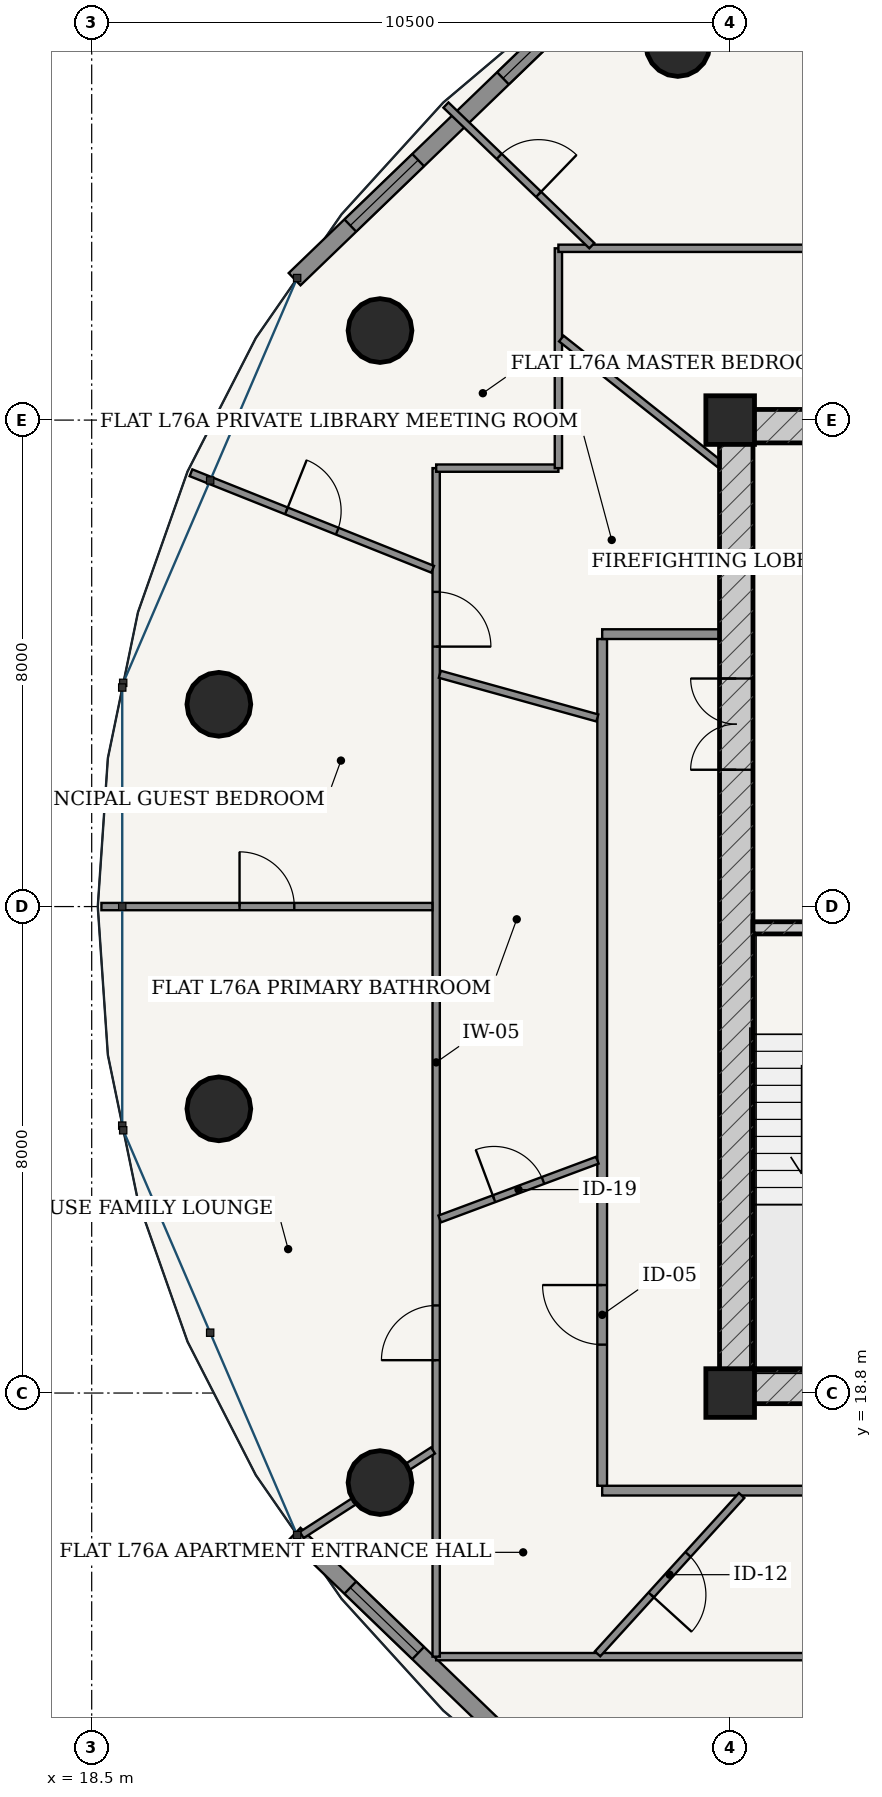
"""IFC4 building model, lengths in metres.
Left out: names, types, materials, properties, quantities, classifications, styles, units other than length and angle.
Written with IfcOpenShell. Run it as: python <this file> out.ifc"""

import sys

from ifc_helpers import new_model, si_unit, direction, frame, frame_2d, origin, origin_2d, place, context, subcontext, project, spatial, rectangle, hollow_circle, extrude, source, transform, mapped, element, fill, save


model = new_model("IFC4")
c1 = context("Model", 3, precision=1e-05, world=origin(), true_north=direction((-0.2419218956, 0.970295726276)))
c2 = subcontext(c1, "Body", "Model", "MODEL_VIEW")
j1 = project(units=[si_unit("LENGTHUNIT", "METRE"), si_unit("PLANEANGLEUNIT", "RADIAN")], contexts=[c1])
p1 = place(None, origin())
s1 = spatial("IfcSite", under=j1, at=p1, CompositionType="ELEMENT")
p2 = place(p1, origin())
s2 = spatial("IfcBuilding", under=s1, at=p2, CompositionType="ELEMENT")
p3 = place(p2, frame((0.0, 0.0, 289.45)))
s3 = spatial("IfcBuildingStorey", under=s2, at=p3, CompositionType="ELEMENT", Elevation=289.45)
for number, where, z_axis, x_axis in (
    (1, (29.0, 18.8, 0.0), (0.0, 0.0, 1.0), (1.0, 0.0, 0.0)),
    (2, (29.0, 34.8, 0.0), (0.0, 0.0, 1.0), (1.0, 0.0, 0.0)),
):
    element("IfcColumn", number, at=place(p3, frame(where, z_axis=z_axis, x_axis=x_axis)), inside=s3, PredefinedType="COLUMN", context=c2, shape_type="SweptSolid", body=[
        extrude(rectangle(XDim=0.8, YDim=0.8, at=origin_2d()), origin(), (0.0, 0.0, 1.0), 3.75),
    ])
p4 = place(p3, frame((28.825, 18.9, 0.0), z_axis=(0.0, 0.0, 1.0), x_axis=(1.0, 0.0, 0.0)))
e3 = element("IfcWall", 3, at=p4, inside=s3, PredefinedType="SHEAR", context=c2, shape_type="SweptSolid", body=[
    extrude(rectangle(XDim=18.35, YDim=0.55, at=frame_2d((9.175, 0.0))), origin(), (0.0, 0.0, 1.0), 3.49),
])
p5 = place(p4, frame((7.41, 0.0, 0.0)))
e4 = element("IfcOpeningElement", 4, at=p5, cuts=e3, PredefinedType="OPENING", context=c2, shape_type="SweptSolid", body=[
    extrude(rectangle(XDim=0.85, YDim=2.1, at=frame_2d((0.425, 1.05))), frame((0.0, 0.285, 0.0), z_axis=(0.0, -1.0, 0.0), x_axis=(1.0, 0.0, 0.0)), (0.0, 0.0, 1.0), 0.57),
])
p6 = place(p4, frame((10.49, 0.0, 0.0)))
e5 = element("IfcOpeningElement", 5, at=p6, cuts=e3, PredefinedType="OPENING", context=c2, shape_type="SweptSolid", body=[
    extrude(rectangle(XDim=0.85, YDim=2.1, at=frame_2d((0.425, 1.05))), frame((0.0, 0.285, 0.0), z_axis=(0.0, -1.0, 0.0), x_axis=(1.0, 0.0, 0.0)), (0.0, 0.0, 1.0), 0.57),
])
p7 = place(p3, frame((28.825, 34.7, 0.0), z_axis=(0.0, 0.0, 1.0), x_axis=(1.0, 0.0, 0.0)))
e6 = element("IfcWall", 6, at=p7, inside=s3, PredefinedType="SHEAR", context=c2, shape_type="SweptSolid", body=[
    extrude(rectangle(XDim=18.35, YDim=0.55, at=frame_2d((9.175, 0.0))), origin(), (0.0, 0.0, 1.0), 3.49),
])
p8 = place(p3, frame((29.1, 19.175, 0.0), z_axis=(0.0, 0.0, 1.0), x_axis=(0.0, 1.0, 0.0)))
e7 = element("IfcWall", 7, at=p8, inside=s3, PredefinedType="SHEAR", context=c2, shape_type="SweptSolid", body=[
    extrude(rectangle(XDim=15.25, YDim=0.55, at=frame_2d((7.625, 0.0))), origin(), (0.0, 0.0, 1.0), 3.49),
])
p9 = place(p8, frame((9.875, 0.0, 0.0)))
e8 = element("IfcOpeningElement", 8, at=p9, cuts=e7, PredefinedType="OPENING", context=c2, shape_type="SweptSolid", body=[
    extrude(rectangle(XDim=1.5, YDim=2.2, at=frame_2d((0.75, 1.1))), frame((0.0, 0.285, 0.0), z_axis=(0.0, -1.0, 0.0), x_axis=(1.0, 0.0, 0.0)), (0.0, 0.0, 1.0), 0.57),
])
p10 = place(p3, frame((29.375, 26.45, 0.0), z_axis=(0.0, 0.0, 1.0), x_axis=(1.0, 0.0, 0.0)))
e9 = element("IfcWall", 9, at=p10, inside=s3, PredefinedType="SOLIDWALL", context=c2, shape_type="SweptSolid", body=[
    extrude(rectangle(XDim=3.32, YDim=0.2, at=frame_2d((1.66, 0.0))), origin(), (0.0, 0.0, 1.0), 3.49),
])
p11 = place(p10, frame((1.185, 0.0, 0.0)))
e10 = element("IfcOpeningElement", 10, at=p11, cuts=e9, PredefinedType="OPENING", context=c2, shape_type="SweptSolid", body=[
    extrude(rectangle(XDim=0.95, YDim=2.15, at=frame_2d((0.475, 1.075))), frame((0.0, 0.11, 0.0), z_axis=(0.0, -1.0, 0.0), x_axis=(1.0, 0.0, 0.0)), (0.0, 0.0, 1.0), 0.22),
])
for number, where, z_axis, x_axis in (
    (11, (28.139, 40.977, 0.0), (0.0, 0.0, 1.0), (1.0, 0.0, 0.0)),
    (12, (23.241, 36.272, 0.0), (0.0, 0.0, 1.0), (1.0, 0.0, 0.0)),
    (13, (20.591, 30.126, 0.0), (0.0, 0.0, 1.0), (1.0, 0.0, 0.0)),
    (14, (20.591, 23.474, 0.0), (0.0, 0.0, 1.0), (1.0, 0.0, 0.0)),
    (15, (23.241, 17.328, 0.0), (0.0, 0.0, 1.0), (1.0, 0.0, 0.0)),
):
    element("IfcColumn", number, at=place(p3, frame(where, z_axis=z_axis, x_axis=x_axis)), inside=s3, PredefinedType="COLUMN", context=c2, shape_type="SweptSolid", body=[
        extrude(hollow_circle(Radius=0.525, WallThickness=0.035, at=origin_2d()), origin(), (0.0, 0.0, 1.0), 3.75),
    ])
p12 = place(p3, frame((27.296, 42.379, 0.0), z_axis=(0.0, 0.0, 1.0), x_axis=(-0.719979309073, -0.693995529169, 0.0)))
e16 = element("IfcWall", 16, at=p12, inside=s3, PredefinedType="SOLIDWALL", context=c2, shape_type="SweptSolid", body=[
    extrude(rectangle(XDim=7.583, YDim=0.28, at=frame_2d((3.791, 0.0))), origin(), (0.0, 0.0, 1.0), 3.49),
])
p13 = place(p12, frame((1.272, 0.0, 0.85)))
e17 = element("IfcOpeningElement", 17, at=p13, cuts=e16, PredefinedType="OPENING", context=c2, shape_type="SweptSolid", body=[
    extrude(rectangle(XDim=1.55, YDim=1.95, at=frame_2d((0.775, 0.975))), frame((0.0, 0.15, 0.0), z_axis=(0.0, -1.0, 0.0), x_axis=(1.0, 0.0, 0.0)), (0.0, 0.0, 1.0), 0.3),
])
p14 = place(p12, frame((4.76, 0.0, 0.85)))
e18 = element("IfcOpeningElement", 18, at=p14, cuts=e16, PredefinedType="OPENING", context=c2, shape_type="SweptSolid", body=[
    extrude(rectangle(XDim=1.55, YDim=1.95, at=frame_2d((0.775, 0.975))), frame((0.0, 0.15, 0.0), z_axis=(0.0, -1.0, 0.0), x_axis=(1.0, 0.0, 0.0)), (0.0, 0.0, 1.0), 0.3),
])
p15 = place(p3, frame((21.837, 16.483, 0.0), z_axis=(0.0, 0.0, 1.0), x_axis=(0.719995397366, -0.69397883813, 0.0)))
e19 = element("IfcWall", 19, at=p15, inside=s3, PredefinedType="SOLIDWALL", context=c2, shape_type="SweptSolid", body=[
    extrude(rectangle(XDim=7.582, YDim=0.28, at=frame_2d((3.791, 0.0))), origin(), (0.0, 0.0, 1.0), 3.49),
])
p16 = place(p15, frame((1.272, 0.0, 0.85)))
e20 = element("IfcOpeningElement", 20, at=p16, cuts=e19, PredefinedType="OPENING", context=c2, shape_type="SweptSolid", body=[
    extrude(rectangle(XDim=1.55, YDim=1.95, at=frame_2d((0.775, 0.975))), frame((0.0, 0.15, 0.0), z_axis=(0.0, -1.0, 0.0), x_axis=(1.0, 0.0, 0.0)), (0.0, 0.0, 1.0), 0.3),
])
p17 = place(p15, frame((4.76, 0.0, 0.85)))
e21 = element("IfcOpeningElement", 21, at=p17, cuts=e19, PredefinedType="OPENING", context=c2, shape_type="SweptSolid", body=[
    extrude(rectangle(XDim=1.55, YDim=1.95, at=frame_2d((0.775, 0.975))), frame((0.0, 0.15, 0.0), z_axis=(0.0, -1.0, 0.0), x_axis=(1.0, 0.0, 0.0)), (0.0, 0.0, 1.0), 0.3),
])
p18 = place(p3, frame((26.895, 17.195, 0.0), z_axis=(0.0, 0.0, 1.0), x_axis=(1.0, 0.0, 0.0)))
e22 = element("IfcWall", 22, at=p18, inside=s3, PredefinedType="PARTITIONING", context=c2, shape_type="SweptSolid", body=[
    extrude(rectangle(XDim=22.21, YDim=0.16, at=frame_2d((11.105, 0.0))), origin(), (0.0, 0.0, 1.0), 3.015),
])
p19 = place(p18, frame((17.365, 0.0, 0.0)))
e23 = element("IfcOpeningElement", 23, at=p19, cuts=e22, PredefinedType="OPENING", context=c2, shape_type="SweptSolid", body=[
    extrude(rectangle(XDim=0.98, YDim=2.2, at=frame_2d((0.49, 1.1))), frame((0.0, 0.09, 0.0), z_axis=(0.0, -1.0, 0.0), x_axis=(1.0, 0.0, 0.0)), (0.0, 0.0, 1.0), 0.18),
])
p20 = place(p3, frame((26.895, 17.275, 0.0), z_axis=(0.0, 0.0, 1.0), x_axis=(0.0, 1.0, 0.0)))
e24 = element("IfcWall", 24, at=p20, inside=s3, PredefinedType="PARTITIONING", context=c2, shape_type="SweptSolid", body=[
    extrude(rectangle(XDim=13.925, YDim=0.16, at=frame_2d((6.962, 0.0))), origin(), (0.0, 0.0, 1.0), 3.015),
])
p21 = place(p20, frame((2.321, 0.0, 0.0)))
e25 = element("IfcOpeningElement", 25, at=p21, cuts=e24, PredefinedType="OPENING", context=c2, shape_type="SweptSolid", body=[
    extrude(rectangle(XDim=0.98, YDim=2.2, at=frame_2d((0.49, 1.1))), frame((0.0, 0.09, 0.0), z_axis=(0.0, -1.0, 0.0), x_axis=(1.0, 0.0, 0.0)), (0.0, 0.0, 1.0), 0.18),
])
p22 = place(p3, frame((26.895, 31.28, 0.0), z_axis=(0.0, 0.0, 1.0), x_axis=(1.0, 0.0, 0.0)))
e26 = element("IfcWall", 26, at=p22, inside=s3, PredefinedType="PARTITIONING", context=c2, shape_type="SweptSolid", body=[
    extrude(rectangle(XDim=1.93, YDim=0.16, at=frame_2d((0.965, 0.0))), origin(), (0.0, 0.0, 1.0), 3.49),
])
p23 = place(p3, frame((35.353, 14.465, 0.0), z_axis=(0.0, 0.0, 1.0), x_axis=(-1.0, 0.0, 0.0)))
e27 = element("IfcWall", 27, at=p23, inside=s3, PredefinedType="PARTITIONING", context=c2, shape_type="SweptSolid", body=[
    extrude(rectangle(XDim=11.188, YDim=0.12, at=frame_2d((5.594, 0.0))), origin(), (0.0, 0.0, 1.0), 3.015),
])
p24 = place(p23, frame((3.997, 0.0, 0.0)))
e28 = element("IfcOpeningElement", 28, at=p24, cuts=e27, PredefinedType="OPENING", context=c2, shape_type="SweptSolid", body=[
    extrude(rectangle(XDim=0.9, YDim=2.15, at=frame_2d((0.45, 1.075))), frame((0.0, 0.07, 0.0), z_axis=(0.0, -1.0, 0.0), x_axis=(1.0, 0.0, 0.0)), (0.0, 0.0, 1.0), 0.14),
])
p25 = place(p3, frame((24.165, 14.465, 0.0), z_axis=(0.0, 0.0, 1.0), x_axis=(0.0, 1.0, 0.0)))
e29 = element("IfcWall", 29, at=p25, inside=s3, PredefinedType="PARTITIONING", context=c2, shape_type="SweptSolid", body=[
    extrude(rectangle(XDim=19.545, YDim=0.12, at=frame_2d((9.772, 0.0))), origin(), (0.0, 0.0, 1.0), 3.015),
])
p26 = place(p25, frame((4.875, 0.0, 0.0)))
e30 = element("IfcOpeningElement", 30, at=p26, cuts=e29, PredefinedType="OPENING", context=c2, shape_type="SweptSolid", body=[
    extrude(rectangle(XDim=0.9, YDim=2.15, at=frame_2d((0.45, 1.075))), frame((0.0, 0.07, 0.0), z_axis=(0.0, -1.0, 0.0), x_axis=(1.0, 0.0, 0.0)), (0.0, 0.0, 1.0), 0.14),
])
p27 = place(p25, frame((16.61, 0.0, 0.0)))
e31 = element("IfcOpeningElement", 31, at=p27, cuts=e29, PredefinedType="OPENING", context=c2, shape_type="SweptSolid", body=[
    extrude(rectangle(XDim=0.9, YDim=2.15, at=frame_2d((0.45, 1.075))), frame((0.0, 0.07, 0.0), z_axis=(0.0, -1.0, 0.0), x_axis=(1.0, 0.0, 0.0)), (0.0, 0.0, 1.0), 0.14),
])
p28 = place(p3, frame((24.165, 34.01, 0.0), z_axis=(0.0, 0.0, 1.0), x_axis=(1.0, 0.0, 0.0)))
e32 = element("IfcWall", 32, at=p28, inside=s3, PredefinedType="PARTITIONING", context=c2, shape_type="SweptSolid", body=[
    extrude(rectangle(XDim=2.01, YDim=0.12, at=frame_2d((1.005, 0.0))), origin(), (0.0, 0.0, 1.0), 3.209),
])
p29 = place(p3, frame((26.175, 34.01, 0.0), z_axis=(0.0, 0.0, 1.0), x_axis=(0.0, 1.0, 0.0)))
e33 = element("IfcWall", 33, at=p29, inside=s3, PredefinedType="PARTITIONING", context=c2, shape_type="SweptSolid", body=[
    extrude(rectangle(XDim=3.615, YDim=0.12, at=frame_2d((1.808, 0.0))), origin(), (0.0, 0.0, 1.0), 3.015),
])
p30 = place(p3, frame((26.175, 37.625, 0.0), z_axis=(0.0, 0.0, 1.0), x_axis=(1.0, 0.0, 0.0)))
e34 = element("IfcWall", 34, at=p30, inside=s3, PredefinedType="PARTITIONING", context=c2, shape_type="SweptSolid", body=[
    extrude(rectangle(XDim=13.957, YDim=0.12, at=frame_2d((6.979, 0.0))), origin(), (0.0, 0.0, 1.0), 3.015),
])
p31 = place(p30, frame((10.852, 0.0, 0.0)))
e35 = element("IfcOpeningElement", 35, at=p31, cuts=e34, PredefinedType="OPENING", context=c2, shape_type="SweptSolid", body=[
    extrude(rectangle(XDim=0.86, YDim=2.15, at=frame_2d((0.43, 1.075))), frame((0.0, 0.07, 0.0), z_axis=(0.0, -1.0, 0.0), x_axis=(1.0, 0.0, 0.0)), (0.0, 0.0, 1.0), 0.14),
])
p32 = place(p30, frame((4.183, 0.0, 0.0)))
e36 = element("IfcOpeningElement", 36, at=p32, cuts=e34, PredefinedType="OPENING", context=c2, shape_type="SweptSolid", body=[
    extrude(rectangle(XDim=0.9, YDim=2.15, at=frame_2d((0.45, 1.075))), frame((0.0, 0.07, 0.0), z_axis=(0.0, -1.0, 0.0), x_axis=(1.0, 0.0, 0.0)), (0.0, 0.0, 1.0), 0.14),
])
p33 = place(p3, frame((26.725, 37.668, 0.0), z_axis=(0.0, 0.0, 1.0), x_axis=(-0.719954096891, 0.694021684366, 0.0)))
e37 = element("IfcWall", 37, at=p33, inside=s3, PredefinedType="PARTITIONING", context=c2, shape_type="SweptSolid", body=[
    extrude(rectangle(XDim=3.333, YDim=0.12, at=frame_2d((1.667, 0.0))), origin(), (0.0, 0.0, 1.0), 3.121),
])
p34 = place(p33, frame((1.216, 0.0, 0.0)))
e38 = element("IfcOpeningElement", 38, at=p34, cuts=e37, PredefinedType="OPENING", context=c2, shape_type="SweptSolid", body=[
    extrude(rectangle(XDim=0.9, YDim=2.15, at=frame_2d((0.45, 1.075))), frame((0.0, 0.07, 0.0), z_axis=(0.0, -1.0, 0.0), x_axis=(1.0, 0.0, 0.0)), (0.0, 0.0, 1.0), 0.14),
])
p35 = place(p3, frame((24.107, 32.347, 0.0), z_axis=(0.0, 0.0, 1.0), x_axis=(-0.928712556691, 0.370800467966, 0.0)))
e39 = element("IfcWall", 39, at=p35, inside=s3, PredefinedType="PARTITIONING", context=c2, shape_type="SweptSolid", body=[
    extrude(rectangle(XDim=4.28, YDim=0.12, at=frame_2d((2.14, 0.0))), origin(), (0.0, 0.0, 1.0), 3.121),
])
p36 = place(p35, frame((1.69, 0.0, 0.0)))
e40 = element("IfcOpeningElement", 40, at=p36, cuts=e39, PredefinedType="OPENING", context=c2, shape_type="SweptSolid", body=[
    extrude(rectangle(XDim=0.9, YDim=2.15, at=frame_2d((0.45, 1.075))), frame((0.0, 0.07, 0.0), z_axis=(0.0, -1.0, 0.0), x_axis=(1.0, 0.0, 0.0)), (0.0, 0.0, 1.0), 0.14),
])
p37 = place(p3, frame((24.103, 26.8, 0.0), z_axis=(0.0, 0.0, 1.0), x_axis=(-1.0, 0.0, 0.0)))
e41 = element("IfcWall", 41, at=p37, inside=s3, PredefinedType="PARTITIONING", context=c2, shape_type="SweptSolid", body=[
    extrude(rectangle(XDim=5.443, YDim=0.12, at=frame_2d((2.722, 0.0))), origin(), (0.0, 0.0, 1.0), 3.121),
])
p38 = place(p37, frame((2.271, 0.0, 0.0)))
e42 = element("IfcOpeningElement", 42, at=p38, cuts=e41, PredefinedType="OPENING", context=c2, shape_type="SweptSolid", body=[
    extrude(rectangle(XDim=0.9, YDim=2.15, at=frame_2d((0.45, 1.075))), frame((0.0, 0.07, 0.0), z_axis=(0.0, -1.0, 0.0), x_axis=(1.0, 0.0, 0.0)), (0.0, 0.0, 1.0), 0.14),
])
p39 = place(p3, frame((24.113, 17.856, 0.0), z_axis=(0.0, 0.0, 1.0), x_axis=(-0.840708587197, -0.54148783127, 0.0)))
e43 = element("IfcWall", 43, at=p39, inside=s3, PredefinedType="PARTITIONING", context=c2, shape_type="SweptSolid", body=[
    extrude(rectangle(XDim=2.568, YDim=0.12, at=frame_2d((1.284, 0.0))), origin(), (0.0, 0.0, 1.0), 3.015),
])
p40 = place(p3, frame((28.825, 34.077, 0.0), z_axis=(0.0, 0.0, 1.0), x_axis=(-0.783444596274, 0.621461635637, 0.0)))
e44 = element("IfcWall", 44, at=p40, inside=s3, PredefinedType="PARTITIONING", context=c2, shape_type="SweptSolid", body=[
    extrude(rectangle(XDim=3.32, YDim=0.12, at=frame_2d((1.66, 0.0))), origin(), (0.0, 0.0, 1.0), 3.209),
])
p41 = place(p3, frame((26.815, 29.902, 0.0), z_axis=(0.0, 0.0, 1.0), x_axis=(-0.963610243268, 0.267311240073, 0.0)))
e45 = element("IfcWall", 45, at=p41, inside=s3, PredefinedType="PARTITIONING", context=c2, shape_type="SweptSolid", body=[
    extrude(rectangle(XDim=2.688, YDim=0.12, at=frame_2d((1.344, 0.0))), origin(), (0.0, 0.0, 1.0), 3.209),
])
p42 = place(p3, frame((26.815, 22.629, 0.0), z_axis=(0.0, 0.0, 1.0), x_axis=(-0.93696600231, -0.349420535338, 0.0)))
e46 = element("IfcWall", 46, at=p42, inside=s3, PredefinedType="PARTITIONING", context=c2, shape_type="SweptSolid", body=[
    extrude(rectangle(XDim=2.766, YDim=0.12, at=frame_2d((1.383, 0.0))), origin(), (0.0, 0.0, 1.0), 3.209),
])
p43 = place(p42, frame((0.953, 0.0, 0.0)))
e47 = element("IfcOpeningElement", 47, at=p43, cuts=e46, PredefinedType="OPENING", context=c2, shape_type="SweptSolid", body=[
    extrude(rectangle(XDim=0.86, YDim=2.15, at=frame_2d((0.43, 1.075))), frame((0.0, 0.07, 0.0), z_axis=(0.0, -1.0, 0.0), x_axis=(1.0, 0.0, 0.0)), (0.0, 0.0, 1.0), 0.14),
])
p44 = place(p3, frame((29.188, 17.115, 0.0), z_axis=(0.0, 0.0, 1.0), x_axis=(-0.67292817107, -0.739707831904, 0.0)))
e48 = element("IfcWall", 48, at=p44, inside=s3, PredefinedType="PARTITIONING", context=c2, shape_type="SweptSolid", body=[
    extrude(rectangle(XDim=3.521, YDim=0.12, at=frame_2d((1.76, 0.0))), origin(), (0.0, 0.0, 1.0), 3.015),
])
p45 = place(p44, frame((1.31, 0.0, 0.0)))
e49 = element("IfcOpeningElement", 49, at=p45, cuts=e48, PredefinedType="OPENING", context=c2, shape_type="SweptSolid", body=[
    extrude(rectangle(XDim=0.9, YDim=2.15, at=frame_2d((0.45, 1.075))), frame((0.0, 0.07, 0.0), z_axis=(0.0, -1.0, 0.0), x_axis=(1.0, 0.0, 0.0)), (0.0, 0.0, 1.0), 0.14),
])
m1 = source(origin(), c2, "Body", "SweptSolid", [
    extrude(rectangle(XDim=1.55, YDim=1.95, at=frame_2d((0.775, 0.975))), frame((0.0, 0.03, 0.0), z_axis=(0.0, -1.0, 0.0), x_axis=(1.0, 0.0, 0.0)), (0.0, 0.0, 1.0), 0.06),
])
p46 = place(p13, origin())
e50 = element("IfcWindow", 50, at=p46, inside=s3, PartitioningType="SINGLE_PANEL", PredefinedType="WINDOW", context=c2, shape_type="MappedRepresentation", body=[
    mapped(m1, transform((0.0, 0.0, 0.0), scale=1.0)),
])
fill(e17, e50)
p47 = place(p14, origin())
e51 = element("IfcWindow", 51, at=p47, inside=s3, PartitioningType="SINGLE_PANEL", PredefinedType="WINDOW", context=c2, shape_type="MappedRepresentation", body=[
    mapped(m1, transform((0.0, 0.0, 0.0), scale=1.0)),
])
fill(e18, e51)
p48 = place(p16, origin())
e52 = element("IfcWindow", 52, at=p48, inside=s3, PartitioningType="SINGLE_PANEL", PredefinedType="WINDOW", context=c2, shape_type="MappedRepresentation", body=[
    mapped(m1, transform((0.0, 0.0, 0.0), scale=1.0)),
])
fill(e20, e52)
m2 = source(origin(), c2, "Body", "SweptSolid", [
    extrude(rectangle(XDim=1.5, YDim=2.2, at=frame_2d((0.75, 1.1))), frame((0.0, 0.025, 0.0), z_axis=(0.0, -1.0, 0.0), x_axis=(1.0, 0.0, 0.0)), (0.0, 0.0, 1.0), 0.05),
])
p49 = place(p9, origin())
e53 = element("IfcDoor", 53, at=p49, inside=s3, OperationType="DOUBLE_DOOR_SINGLE_SWING", PredefinedType="DOOR", context=c2, shape_type="MappedRepresentation", body=[
    mapped(m2, transform((0.0, 0.0, 0.0), scale=1.0)),
])
fill(e8, e53)
m3 = source(origin(), c2, "Body", "SweptSolid", [
    extrude(rectangle(XDim=0.98, YDim=2.2, at=frame_2d((0.49, 1.1))), frame((0.0, 0.025, 0.0), z_axis=(0.0, -1.0, 0.0), x_axis=(1.0, 0.0, 0.0)), (0.0, 0.0, 1.0), 0.05),
])
p50 = place(p21, origin())
e54 = element("IfcDoor", 54, at=p50, inside=s3, OperationType="SINGLE_SWING_RIGHT", PredefinedType="DOOR", context=c2, shape_type="MappedRepresentation", body=[
    mapped(m3, transform((0.0, 0.0, 0.0), scale=1.0)),
])
fill(e25, e54)
m4 = source(origin(), c2, "Body", "SweptSolid", [
    extrude(rectangle(XDim=0.86, YDim=2.15, at=frame_2d((0.43, 1.075))), frame((0.0, 0.025, 0.0), z_axis=(0.0, -1.0, 0.0), x_axis=(1.0, 0.0, 0.0)), (0.0, 0.0, 1.0), 0.05),
])
p51 = place(p43, frame((0.86, 0.0, 0.0), z_axis=(0.0, 0.0, 1.0), x_axis=(-1.0, 0.0, 0.0)))
e55 = element("IfcDoor", 55, at=p51, inside=s3, OperationType="SINGLE_SWING_LEFT", PredefinedType="DOOR", context=c2, shape_type="MappedRepresentation", body=[
    mapped(m4, transform((0.0, 0.0, 0.0), scale=1.0)),
])
fill(e47, e55)
m5 = source(origin(), c2, "Body", "SweptSolid", [
    extrude(rectangle(XDim=0.9, YDim=2.15, at=frame_2d((0.45, 1.075))), frame((0.0, 0.025, 0.0), z_axis=(0.0, -1.0, 0.0), x_axis=(1.0, 0.0, 0.0)), (0.0, 0.0, 1.0), 0.05),
])
p52 = place(p45, origin())
e56 = element("IfcDoor", 56, at=p52, inside=s3, OperationType="SINGLE_SWING_RIGHT", PredefinedType="DOOR", context=c2, shape_type="MappedRepresentation", body=[
    mapped(m5, transform((0.0, 0.0, 0.0), scale=1.0)),
])
fill(e49, e56)
p53 = place(p26, origin())
e57 = element("IfcDoor", 57, at=p53, inside=s3, OperationType="SINGLE_SWING_LEFT", PredefinedType="DOOR", context=c2, shape_type="MappedRepresentation", body=[
    mapped(m5, transform((0.0, 0.0, 0.0), scale=1.0)),
])
fill(e30, e57)
p54 = place(p38, frame((0.9, 0.0, 0.0), z_axis=(0.0, 0.0, 1.0), x_axis=(-1.0, 0.0, 0.0)))
e58 = element("IfcDoor", 58, at=p54, inside=s3, OperationType="SINGLE_SWING_LEFT", PredefinedType="DOOR", context=c2, shape_type="MappedRepresentation", body=[
    mapped(m5, transform((0.0, 0.0, 0.0), scale=1.0)),
])
fill(e42, e58)
p55 = place(p27, frame((0.9, 0.0, 0.0), z_axis=(0.0, 0.0, 1.0), x_axis=(-1.0, 0.0, 0.0)))
e59 = element("IfcDoor", 59, at=p55, inside=s3, OperationType="SINGLE_SWING_RIGHT", PredefinedType="DOOR", context=c2, shape_type="MappedRepresentation", body=[
    mapped(m5, transform((0.0, 0.0, 0.0), scale=1.0)),
])
fill(e31, e59)
p56 = place(p36, frame((0.9, 0.0, 0.0), z_axis=(0.0, 0.0, 1.0), x_axis=(-1.0, 0.0, 0.0)))
e60 = element("IfcDoor", 60, at=p56, inside=s3, OperationType="SINGLE_SWING_LEFT", PredefinedType="DOOR", context=c2, shape_type="MappedRepresentation", body=[
    mapped(m5, transform((0.0, 0.0, 0.0), scale=1.0)),
])
fill(e40, e60)
p57 = place(p34, frame((0.9, 0.0, 0.0), z_axis=(0.0, 0.0, 1.0), x_axis=(-1.0, 0.0, 0.0)))
e61 = element("IfcDoor", 61, at=p57, inside=s3, OperationType="SINGLE_SWING_RIGHT", PredefinedType="DOOR", context=c2, shape_type="MappedRepresentation", body=[
    mapped(m5, transform((0.0, 0.0, 0.0), scale=1.0)),
])
fill(e38, e61)
save(model, sys.argv[1])
